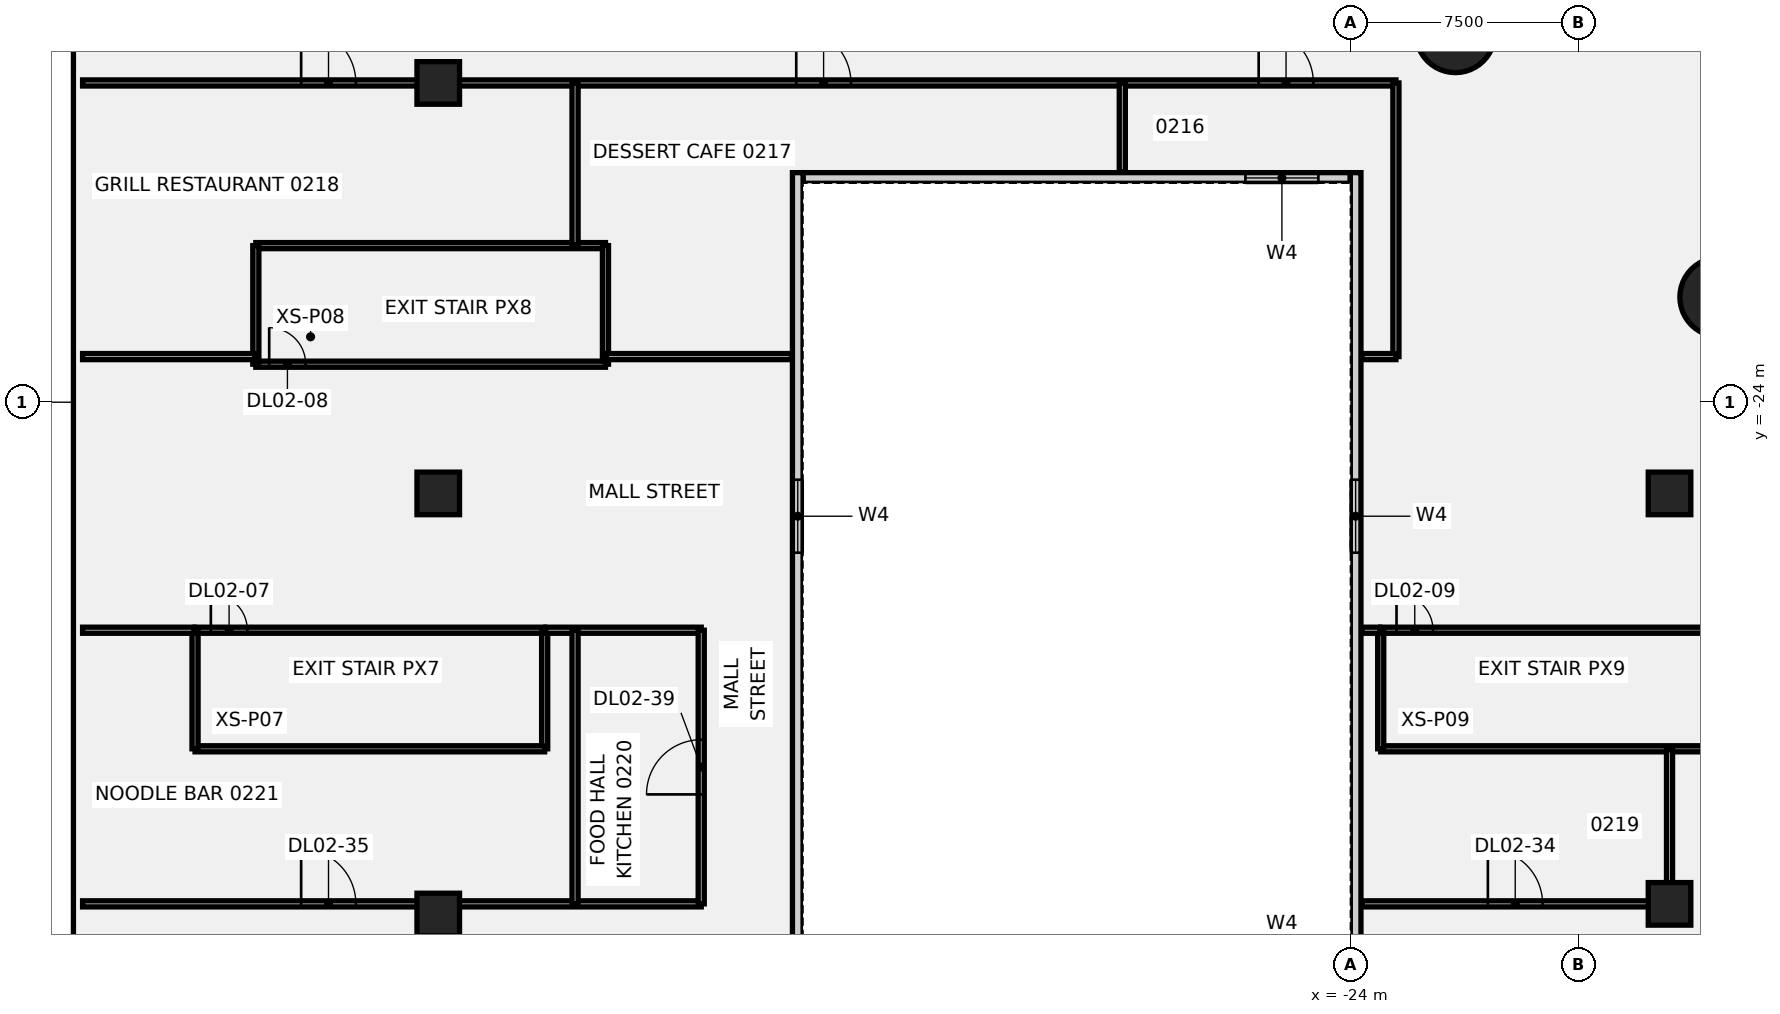
"""IFC4 building model, lengths in metres.
Left out: names, types, materials, properties, quantities, classifications, styles, units other than length and angle.
Written with IfcOpenShell. Run it as: python <this file> out.ifc"""

import sys

from ifc_helpers import new_model, si_unit, direction, frame, frame_2d, origin, origin_2d, place, context, subcontext, project, spatial, rectangle, circle, extrude, element, fill, save


model = new_model("IFC4")
c1 = context("Model", 3, precision=1e-05, world=origin(), true_north=direction((0.0, 1.0)))
c2 = subcontext(c1, "Body", "Model", "MODEL_VIEW")
j1 = project(units=[si_unit("LENGTHUNIT", "METRE"), si_unit("PLANEANGLEUNIT", "RADIAN")], contexts=[c1])
p1 = place(None, origin())
s1 = spatial("IfcSite", under=j1, at=p1, CompositionType="ELEMENT")
p2 = place(p1, origin())
s2 = spatial("IfcBuilding", under=s1, at=p2, CompositionType="ELEMENT")
p3 = place(p2, frame((0.0, 0.0, 15.0)))
s3 = spatial("IfcBuildingStorey", under=s2, at=p3, CompositionType="ELEMENT", Elevation=15.0)
for number, where, z_axis, x_axis in (
    (1, (-20.543, -11.86, -0.5), (0.0, 0.0, 1.0), (1.0, 0.0, 0.0)),
    (2, (-11.86, -20.543, -0.5), (0.0, 0.0, 1.0), (1.0, 0.0, 0.0)),
):
    element("IfcColumn", number, at=place(p3, frame(where, z_axis=z_axis, x_axis=x_axis)), inside=s3, PredefinedType="COLUMN", context=c2, shape_type="SweptSolid", body=[
        extrude(circle(Radius=1.3, at=origin_2d()), origin(), (0.0, 0.0, 1.0), 5.0),
    ])
for number, where, z_axis, x_axis in (
    (3, (-54.0, -40.85, -0.5), (0.0, 0.0, 1.0), (1.0, 0.0, 0.0)),
    (4, (-54.0, -27.0, -0.5), (0.0, 0.0, 1.0), (1.0, 0.0, 0.0)),
    (5, (-54.0, -13.5, -0.5), (0.0, 0.0, 1.0), (1.0, 0.0, 0.0)),
    (6, (-13.5, -40.5, -0.5), (0.0, 0.0, 1.0), (1.0, 0.0, 0.0)),
    (7, (-13.5, -27.0, -0.5), (0.0, 0.0, 1.0), (1.0, 0.0, 0.0)),
):
    element("IfcColumn", number, at=place(p3, frame(where, z_axis=z_axis, x_axis=x_axis)), inside=s3, PredefinedType="COLUMN", context=c2, shape_type="SweptSolid", body=[
        extrude(rectangle(XDim=1.4, YDim=1.4, at=origin_2d()), origin(), (0.0, 0.0, 1.0), 5.0),
    ])
p4 = place(p3, frame((-62.0, -31.5, 0.0), z_axis=(0.0, 0.0, 1.0), x_axis=(1.0, 0.0, 0.0)))
e8 = element("IfcWall", 8, at=p4, inside=s3, PredefinedType="PARTITIONING", context=c2, shape_type="SweptSolid", body=[
    extrude(rectangle(XDim=11.5, YDim=0.2, at=frame_2d((5.75, 0.0))), origin(), (0.0, 0.0, 1.0), 4.5),
])
p5 = place(p4, frame((0.52, 0.0, 0.0)))
e9 = element("IfcOpeningElement", 9, at=p5, cuts=e8, PredefinedType="OPENING", context=c2, shape_type="SweptSolid", body=[
    extrude(rectangle(XDim=1.2, YDim=2.1, at=frame_2d((0.6, 1.05))), frame((0.0, 0.11, 0.0), z_axis=(0.0, -1.0, 0.0), x_axis=(1.0, 0.0, 0.0)), (0.0, 0.0, 1.0), 0.22),
])
p6 = place(p3, frame((-50.5, -35.4, 0.0), z_axis=(0.0, 0.0, 1.0), x_axis=(0.0, 1.0, 0.0)))
e10 = element("IfcWall", 10, at=p6, inside=s3, PredefinedType="PARTITIONING", context=c2, shape_type="SweptSolid", body=[
    extrude(rectangle(XDim=3.9, YDim=0.2, at=frame_2d((1.95, 0.0))), origin(), (0.0, 0.0, 1.0), 4.5),
])
p7 = place(p3, frame((-62.0, -35.4, 0.0), z_axis=(0.0, 0.0, 1.0), x_axis=(1.0, 0.0, 0.0)))
e11 = element("IfcWall", 11, at=p7, inside=s3, PredefinedType="PARTITIONING", context=c2, shape_type="SweptSolid", body=[
    extrude(rectangle(XDim=11.5, YDim=0.2, at=frame_2d((5.75, 0.0))), origin(), (0.0, 0.0, 1.0), 4.5),
])
p8 = place(p3, frame((-62.0, -35.4, 0.0), z_axis=(0.0, 0.0, 1.0), x_axis=(0.0, 1.0, 0.0)))
e12 = element("IfcWall", 12, at=p8, inside=s3, PredefinedType="PARTITIONING", context=c2, shape_type="SweptSolid", body=[
    extrude(rectangle(XDim=3.9, YDim=0.2, at=frame_2d((1.95, 0.0))), origin(), (0.0, 0.0, 1.0), 4.5),
])
p9 = place(p3, frame((-60.0, -18.85, 0.0), z_axis=(0.0, 0.0, 1.0), x_axis=(1.0, 0.0, 0.0)))
e13 = element("IfcWall", 13, at=p9, inside=s3, PredefinedType="PARTITIONING", context=c2, shape_type="SweptSolid", body=[
    extrude(rectangle(XDim=11.5, YDim=0.2, at=frame_2d((5.75, 0.0))), origin(), (0.0, 0.0, 1.0), 4.5),
])
p10 = place(p3, frame((-48.5, -22.75, 0.0), z_axis=(0.0, 0.0, 1.0), x_axis=(0.0, 1.0, 0.0)))
e14 = element("IfcWall", 14, at=p10, inside=s3, PredefinedType="PARTITIONING", context=c2, shape_type="SweptSolid", body=[
    extrude(rectangle(XDim=3.9, YDim=0.2, at=frame_2d((1.95, 0.0))), origin(), (0.0, 0.0, 1.0), 4.5),
])
p11 = place(p3, frame((-60.0, -22.75, 0.0), z_axis=(0.0, 0.0, 1.0), x_axis=(1.0, 0.0, 0.0)))
e15 = element("IfcWall", 15, at=p11, inside=s3, PredefinedType="PARTITIONING", context=c2, shape_type="SweptSolid", body=[
    extrude(rectangle(XDim=11.5, YDim=0.2, at=frame_2d((5.75, 0.0))), origin(), (0.0, 0.0, 1.0), 4.5),
])
p12 = place(p11, frame((0.439, 0.0, 0.0)))
e16 = element("IfcOpeningElement", 16, at=p12, cuts=e15, PredefinedType="OPENING", context=c2, shape_type="SweptSolid", body=[
    extrude(rectangle(XDim=1.2, YDim=2.1, at=frame_2d((0.6, 1.05))), frame((0.0, 0.11, 0.0), z_axis=(0.0, -1.0, 0.0), x_axis=(1.0, 0.0, 0.0)), (0.0, 0.0, 1.0), 0.22),
])
p13 = place(p3, frame((-60.0, -22.75, 0.0), z_axis=(0.0, 0.0, 1.0), x_axis=(0.0, 1.0, 0.0)))
e17 = element("IfcWall", 17, at=p13, inside=s3, PredefinedType="PARTITIONING", context=c2, shape_type="SweptSolid", body=[
    extrude(rectangle(XDim=3.9, YDim=0.2, at=frame_2d((1.95, 0.0))), origin(), (0.0, 0.0, 1.0), 4.5),
])
p14 = place(p3, frame((-23.0, -31.5, 0.0), z_axis=(0.0, 0.0, 1.0), x_axis=(1.0, 0.0, 0.0)))
e18 = element("IfcWall", 18, at=p14, inside=s3, PredefinedType="PARTITIONING", context=c2, shape_type="SweptSolid", body=[
    extrude(rectangle(XDim=11.5, YDim=0.2, at=frame_2d((5.75, 0.0))), origin(), (0.0, 0.0, 1.0), 4.5),
])
p15 = place(p14, frame((0.52, 0.0, 0.0)))
e19 = element("IfcOpeningElement", 19, at=p15, cuts=e18, PredefinedType="OPENING", context=c2, shape_type="SweptSolid", body=[
    extrude(rectangle(XDim=1.2, YDim=2.1, at=frame_2d((0.6, 1.05))), frame((0.0, 0.11, 0.0), z_axis=(0.0, -1.0, 0.0), x_axis=(1.0, 0.0, 0.0)), (0.0, 0.0, 1.0), 0.22),
])
p16 = place(p3, frame((-23.0, -35.4, 0.0), z_axis=(0.0, 0.0, 1.0), x_axis=(1.0, 0.0, 0.0)))
e20 = element("IfcWall", 20, at=p16, inside=s3, PredefinedType="PARTITIONING", context=c2, shape_type="SweptSolid", body=[
    extrude(rectangle(XDim=11.5, YDim=0.2, at=frame_2d((5.75, 0.0))), origin(), (0.0, 0.0, 1.0), 4.5),
])
p17 = place(p3, frame((-23.0, -35.4, 0.0), z_axis=(0.0, 0.0, 1.0), x_axis=(0.0, 1.0, 0.0)))
e21 = element("IfcWall", 21, at=p17, inside=s3, PredefinedType="PARTITIONING", context=c2, shape_type="SweptSolid", body=[
    extrude(rectangle(XDim=3.9, YDim=0.2, at=frame_2d((1.95, 0.0))), origin(), (0.0, 0.0, 1.0), 4.5),
])
p18 = place(p3, frame((-65.699, -40.5, 0.0), z_axis=(0.0, 0.0, 1.0), x_axis=(1.0, 0.0, 0.0)))
e22 = element("IfcWall", 22, at=p18, inside=s3, PredefinedType="PARTITIONING", context=c2, shape_type="SweptSolid", body=[
    extrude(rectangle(XDim=20.349, YDim=0.2, at=frame_2d((10.174, 0.0))), origin(), (0.0, 0.0, 1.0), 4.5),
])
p19 = place(p18, frame((7.189, 0.0, 0.0)))
e23 = element("IfcOpeningElement", 23, at=p19, cuts=e22, PredefinedType="OPENING", context=c2, shape_type="SweptSolid", body=[
    extrude(rectangle(XDim=1.8, YDim=2.1, at=frame_2d((0.9, 1.05))), frame((0.0, 0.11, 0.0), z_axis=(0.0, -1.0, 0.0), x_axis=(1.0, 0.0, 0.0)), (0.0, 0.0, 1.0), 0.22),
])
p20 = place(p3, frame((-65.699, -31.5, 0.0), z_axis=(0.0, 0.0, 1.0), x_axis=(1.0, 0.0, 0.0)))
e24 = element("IfcWall", 24, at=p20, inside=s3, PredefinedType="PARTITIONING", context=c2, shape_type="SweptSolid", body=[
    extrude(rectangle(XDim=3.669, YDim=0.2, at=frame_2d((1.834, 0.0))), origin(), (0.0, 0.0, 1.0), 4.5),
])
p21 = place(p3, frame((-65.699, -22.5, 0.0), z_axis=(0.0, 0.0, 1.0), x_axis=(1.0, 0.0, 0.0)))
e25 = element("IfcWall", 25, at=p21, inside=s3, PredefinedType="PARTITIONING", context=c2, shape_type="SweptSolid", body=[
    extrude(rectangle(XDim=5.669, YDim=0.2, at=frame_2d((2.834, 0.0))), origin(), (0.0, 0.0, 1.0), 4.5),
])
p22 = place(p3, frame((-65.699, -13.5, 0.0), z_axis=(0.0, 0.0, 1.0), x_axis=(1.0, 0.0, 0.0)))
e26 = element("IfcWall", 26, at=p22, inside=s3, PredefinedType="PARTITIONING", context=c2, shape_type="SweptSolid", body=[
    extrude(rectangle(XDim=43.199, YDim=0.2, at=frame_2d((21.6, 0.0))), origin(), (0.0, 0.0, 1.0), 4.5),
])
p23 = place(p22, frame((38.685, 0.0, 0.0)))
e27 = element("IfcOpeningElement", 27, at=p23, cuts=e26, PredefinedType="OPENING", context=c2, shape_type="SweptSolid", body=[
    extrude(rectangle(XDim=1.8, YDim=2.1, at=frame_2d((0.9, 1.05))), frame((0.0, 0.11, 0.0), z_axis=(0.0, -1.0, 0.0), x_axis=(1.0, 0.0, 0.0)), (0.0, 0.0, 1.0), 0.22),
])
p24 = place(p22, frame((23.474, 0.0, 0.0)))
e28 = element("IfcOpeningElement", 28, at=p24, cuts=e26, PredefinedType="OPENING", context=c2, shape_type="SweptSolid", body=[
    extrude(rectangle(XDim=1.8, YDim=2.1, at=frame_2d((0.9, 1.05))), frame((0.0, 0.11, 0.0), z_axis=(0.0, -1.0, 0.0), x_axis=(1.0, 0.0, 0.0)), (0.0, 0.0, 1.0), 0.22),
])
p25 = place(p22, frame((7.189, 0.0, 0.0)))
e29 = element("IfcOpeningElement", 29, at=p25, cuts=e26, PredefinedType="OPENING", context=c2, shape_type="SweptSolid", body=[
    extrude(rectangle(XDim=1.8, YDim=2.1, at=frame_2d((0.9, 1.05))), frame((0.0, 0.11, 0.0), z_axis=(0.0, -1.0, 0.0), x_axis=(1.0, 0.0, 0.0)), (0.0, 0.0, 1.0), 0.22),
])
p26 = place(p3, frame((-50.47, -31.5, 0.0), z_axis=(0.0, 0.0, 1.0), x_axis=(1.0, 0.0, 0.0)))
e30 = element("IfcWall", 30, at=p26, inside=s3, PredefinedType="PARTITIONING", context=c2, shape_type="SweptSolid", body=[
    extrude(rectangle(XDim=5.12, YDim=0.2, at=frame_2d((2.56, 0.0))), origin(), (0.0, 0.0, 1.0), 4.5),
])
p27 = place(p3, frame((-45.35, -40.5, 0.0), z_axis=(0.0, 0.0, 1.0), x_axis=(0.0, 1.0, 0.0)))
e31 = element("IfcWall", 31, at=p27, inside=s3, PredefinedType="PARTITIONING", context=c2, shape_type="SweptSolid", body=[
    extrude(rectangle(XDim=9.0, YDim=0.2, at=frame_2d((4.5, 0.0))), origin(), (0.0, 0.0, 1.0), 4.5),
])
p28 = place(p27, frame((3.6, 0.0, 0.0)))
e32 = element("IfcOpeningElement", 32, at=p28, cuts=e31, PredefinedType="OPENING", context=c2, shape_type="SweptSolid", body=[
    extrude(rectangle(XDim=1.8, YDim=2.1, at=frame_2d((0.9, 1.05))), frame((0.0, 0.11, 0.0), z_axis=(0.0, -1.0, 0.0), x_axis=(1.0, 0.0, 0.0)), (0.0, 0.0, 1.0), 0.22),
])
p29 = place(p3, frame((-49.5, -40.5, 0.0), z_axis=(0.0, 0.0, 1.0), x_axis=(0.0, 1.0, 0.0)))
e33 = element("IfcWall", 33, at=p29, inside=s3, PredefinedType="PARTITIONING", context=c2, shape_type="SweptSolid", body=[
    extrude(rectangle(XDim=9.0, YDim=0.2, at=frame_2d((4.5, 0.0))), origin(), (0.0, 0.0, 1.0), 4.5),
])
p30 = place(p3, frame((-49.5, -18.82, 0.0), z_axis=(0.0, 0.0, 1.0), x_axis=(0.0, 1.0, 0.0)))
e34 = element("IfcWall", 34, at=p30, inside=s3, PredefinedType="PARTITIONING", context=c2, shape_type="SweptSolid", body=[
    extrude(rectangle(XDim=5.32, YDim=0.2, at=frame_2d((2.66, 0.0))), origin(), (0.0, 0.0, 1.0), 4.5),
])
p31 = place(p3, frame((-48.47, -22.5, 0.0), z_axis=(0.0, 0.0, 1.0), x_axis=(1.0, 0.0, 0.0)))
e35 = element("IfcWall", 35, at=p31, inside=s3, PredefinedType="PARTITIONING", context=c2, shape_type="SweptSolid", body=[
    extrude(rectangle(XDim=6.09, YDim=0.2, at=frame_2d((3.045, 0.0))), origin(), (0.0, 0.0, 1.0), 4.5),
])
p32 = place(p3, frame((-31.5, -16.42, 0.0), z_axis=(0.0, 0.0, 1.0), x_axis=(0.0, 1.0, 0.0)))
e36 = element("IfcWall", 36, at=p32, inside=s3, PredefinedType="PARTITIONING", context=c2, shape_type="SweptSolid", body=[
    extrude(rectangle(XDim=2.92, YDim=0.2, at=frame_2d((1.46, 0.0))), origin(), (0.0, 0.0, 1.0), 4.5),
])
p33 = place(p3, frame((-22.5, -22.5, 0.0), z_axis=(0.0, 0.0, 1.0), x_axis=(0.0, 1.0, 0.0)))
e37 = element("IfcWall", 37, at=p33, inside=s3, PredefinedType="PARTITIONING", context=c2, shape_type="SweptSolid", body=[
    extrude(rectangle(XDim=9.0, YDim=0.2, at=frame_2d((4.5, 0.0))), origin(), (0.0, 0.0, 1.0), 4.5),
])
p34 = place(p3, frame((-23.62, -22.5, 0.0), z_axis=(0.0, 0.0, 1.0), x_axis=(1.0, 0.0, 0.0)))
e38 = element("IfcWall", 38, at=p34, inside=s3, PredefinedType="PARTITIONING", context=c2, shape_type="SweptSolid", body=[
    extrude(rectangle(XDim=1.12, YDim=0.2, at=frame_2d((0.56, 0.0))), origin(), (0.0, 0.0, 1.0), 4.5),
])
p35 = place(p3, frame((-13.5, -40.5, 0.0), z_axis=(0.0, 0.0, 1.0), x_axis=(0.0, 1.0, 0.0)))
e39 = element("IfcWall", 39, at=p35, inside=s3, PredefinedType="PARTITIONING", context=c2, shape_type="SweptSolid", body=[
    extrude(rectangle(XDim=5.07, YDim=0.2, at=frame_2d((2.535, 0.0))), origin(), (0.0, 0.0, 1.0), 4.5),
])
p36 = place(p3, frame((-23.62, -40.5, 0.0), z_axis=(0.0, 0.0, 1.0), x_axis=(1.0, 0.0, 0.0)))
e40 = element("IfcWall", 40, at=p36, inside=s3, PredefinedType="PARTITIONING", context=c2, shape_type="SweptSolid", body=[
    extrude(rectangle(XDim=10.12, YDim=0.2, at=frame_2d((5.06, 0.0))), origin(), (0.0, 0.0, 1.0), 4.5),
])
p37 = place(p36, frame((4.145, 0.0, 0.0)))
e41 = element("IfcOpeningElement", 41, at=p37, cuts=e40, PredefinedType="OPENING", context=c2, shape_type="SweptSolid", body=[
    extrude(rectangle(XDim=1.8, YDim=2.1, at=frame_2d((0.9, 1.05))), frame((0.0, 0.11, 0.0), z_axis=(0.0, -1.0, 0.0), x_axis=(1.0, 0.0, 0.0)), (0.0, 0.0, 1.0), 0.22),
])
p38 = place(p3, frame((-23.62, -31.5, 0.0), z_axis=(0.0, 0.0, 1.0), x_axis=(1.0, 0.0, 0.0)))
e42 = element("IfcWall", 42, at=p38, inside=s3, PredefinedType="PARTITIONING", context=c2, shape_type="SweptSolid", body=[
    extrude(rectangle(XDim=0.59, YDim=0.2, at=frame_2d((0.295, 0.0))), origin(), (0.0, 0.0, 1.0), 4.5),
])
p39 = place(p3, frame((-42.0, -16.625, 0.0), z_axis=(0.0, 0.0, 1.0), x_axis=(1.0, 0.0, 0.0)))
e43 = element("IfcWall", 43, at=p39, inside=s3, PredefinedType="SOLIDWALL", context=c2, shape_type="SweptSolid", body=[
    extrude(rectangle(XDim=18.0, YDim=0.35, at=frame_2d((9.0, 0.0))), origin(), (0.0, 0.0, 1.0), 4.5),
])
p40 = place(p39, frame((14.55, 0.0, 1.0)))
e44 = element("IfcOpeningElement", 44, at=p40, cuts=e43, PredefinedType="OPENING", context=c2, shape_type="SweptSolid", body=[
    extrude(rectangle(XDim=2.4, YDim=1.8, at=frame_2d((1.2, 0.9))), frame((0.0, 0.185, 0.0), z_axis=(0.0, -1.0, 0.0), x_axis=(1.0, 0.0, 0.0)), (0.0, 0.0, 1.0), 0.37),
])
p41 = place(p3, frame((-42.175, -43.85, 0.0), z_axis=(0.0, 0.0, 1.0), x_axis=(0.0, 1.0, 0.0)))
e45 = element("IfcWall", 45, at=p41, inside=s3, PredefinedType="SOLIDWALL", context=c2, shape_type="SweptSolid", body=[
    extrude(rectangle(XDim=27.4, YDim=0.35, at=frame_2d((13.7, 0.0))), origin(), (0.0, 0.0, 1.0), 4.5),
])
p42 = place(p41, frame((14.9, 0.0, 1.0)))
e46 = element("IfcOpeningElement", 46, at=p42, cuts=e45, PredefinedType="OPENING", context=c2, shape_type="SweptSolid", body=[
    extrude(rectangle(XDim=2.4, YDim=1.8, at=frame_2d((1.2, 0.9))), frame((0.0, 0.185, 0.0), z_axis=(0.0, -1.0, 0.0), x_axis=(1.0, 0.0, 0.0)), (0.0, 0.0, 1.0), 0.37),
])
p43 = place(p3, frame((-23.825, -43.85, 0.0), z_axis=(0.0, 0.0, 1.0), x_axis=(0.0, 1.0, 0.0)))
e47 = element("IfcWall", 47, at=p43, inside=s3, PredefinedType="SOLIDWALL", context=c2, shape_type="SweptSolid", body=[
    extrude(rectangle(XDim=27.4, YDim=0.35, at=frame_2d((13.7, 0.0))), origin(), (0.0, 0.0, 1.0), 4.5),
])
p44 = place(p43, frame((14.9, 0.0, 1.0)))
e48 = element("IfcOpeningElement", 48, at=p44, cuts=e47, PredefinedType="OPENING", context=c2, shape_type="SweptSolid", body=[
    extrude(rectangle(XDim=2.4, YDim=1.8, at=frame_2d((1.2, 0.9))), frame((0.0, 0.185, 0.0), z_axis=(0.0, -1.0, 0.0), x_axis=(1.0, 0.0, 0.0)), (0.0, 0.0, 1.0), 0.37),
])
p45 = place(p5, origin())
e49 = element("IfcDoor", 49, at=p45, inside=s3, OperationType="SINGLE_SWING_LEFT", PredefinedType="DOOR", context=c2, shape_type="SweptSolid", body=[
    extrude(rectangle(XDim=1.2, YDim=2.1, at=frame_2d((0.6, 1.05))), frame((0.0, 0.025, 0.0), z_axis=(0.0, -1.0, 0.0), x_axis=(1.0, 0.0, 0.0)), (0.0, 0.0, 1.0), 0.05),
])
fill(e9, e49)
p46 = place(p12, origin())
e50 = element("IfcDoor", 50, at=p46, inside=s3, OperationType="SINGLE_SWING_RIGHT", PredefinedType="DOOR", context=c2, shape_type="SweptSolid", body=[
    extrude(rectangle(XDim=1.2, YDim=2.1, at=frame_2d((0.6, 1.05))), frame((0.0, 0.025, 0.0), z_axis=(0.0, -1.0, 0.0), x_axis=(1.0, 0.0, 0.0)), (0.0, 0.0, 1.0), 0.05),
])
fill(e16, e50)
p47 = place(p15, origin())
e51 = element("IfcDoor", 51, at=p47, inside=s3, OperationType="SINGLE_SWING_LEFT", PredefinedType="DOOR", context=c2, shape_type="SweptSolid", body=[
    extrude(rectangle(XDim=1.2, YDim=2.1, at=frame_2d((0.6, 1.05))), frame((0.0, 0.025, 0.0), z_axis=(0.0, -1.0, 0.0), x_axis=(1.0, 0.0, 0.0)), (0.0, 0.0, 1.0), 0.05),
])
fill(e19, e51)
p48 = place(p23, origin())
e52 = element("IfcDoor", 52, at=p48, inside=s3, OperationType="SINGLE_SWING_LEFT", PredefinedType="DOOR", context=c2, shape_type="SweptSolid", body=[
    extrude(rectangle(XDim=1.8, YDim=2.1, at=frame_2d((0.9, 1.05))), frame((0.0, 0.025, 0.0), z_axis=(0.0, -1.0, 0.0), x_axis=(1.0, 0.0, 0.0)), (0.0, 0.0, 1.0), 0.05),
])
fill(e27, e52)
p49 = place(p24, origin())
e53 = element("IfcDoor", 53, at=p49, inside=s3, OperationType="SINGLE_SWING_RIGHT", PredefinedType="DOOR", context=c2, shape_type="SweptSolid", body=[
    extrude(rectangle(XDim=1.8, YDim=2.1, at=frame_2d((0.9, 1.05))), frame((0.0, 0.025, 0.0), z_axis=(0.0, -1.0, 0.0), x_axis=(1.0, 0.0, 0.0)), (0.0, 0.0, 1.0), 0.05),
])
fill(e28, e53)
p50 = place(p25, origin())
e54 = element("IfcDoor", 54, at=p50, inside=s3, OperationType="SINGLE_SWING_LEFT", PredefinedType="DOOR", context=c2, shape_type="SweptSolid", body=[
    extrude(rectangle(XDim=1.8, YDim=2.1, at=frame_2d((0.9, 1.05))), frame((0.0, 0.025, 0.0), z_axis=(0.0, -1.0, 0.0), x_axis=(1.0, 0.0, 0.0)), (0.0, 0.0, 1.0), 0.05),
])
fill(e29, e54)
p51 = place(p37, origin())
e55 = element("IfcDoor", 55, at=p51, inside=s3, OperationType="SINGLE_SWING_RIGHT", PredefinedType="DOOR", context=c2, shape_type="SweptSolid", body=[
    extrude(rectangle(XDim=1.8, YDim=2.1, at=frame_2d((0.9, 1.05))), frame((0.0, 0.025, 0.0), z_axis=(0.0, -1.0, 0.0), x_axis=(1.0, 0.0, 0.0)), (0.0, 0.0, 1.0), 0.05),
])
fill(e41, e55)
p52 = place(p19, origin())
e56 = element("IfcDoor", 56, at=p52, inside=s3, OperationType="SINGLE_SWING_LEFT", PredefinedType="DOOR", context=c2, shape_type="SweptSolid", body=[
    extrude(rectangle(XDim=1.8, YDim=2.1, at=frame_2d((0.9, 1.05))), frame((0.0, 0.025, 0.0), z_axis=(0.0, -1.0, 0.0), x_axis=(1.0, 0.0, 0.0)), (0.0, 0.0, 1.0), 0.05),
])
fill(e23, e56)
p53 = place(p28, origin())
e57 = element("IfcDoor", 57, at=p53, inside=s3, OperationType="SINGLE_SWING_LEFT", PredefinedType="DOOR", context=c2, shape_type="SweptSolid", body=[
    extrude(rectangle(XDim=1.8, YDim=2.1, at=frame_2d((0.9, 1.05))), frame((0.0, 0.025, 0.0), z_axis=(0.0, -1.0, 0.0), x_axis=(1.0, 0.0, 0.0)), (0.0, 0.0, 1.0), 0.05),
])
fill(e32, e57)
p54 = place(p40, origin())
e58 = element("IfcWindow", 58, at=p54, inside=s3, PartitioningType="SINGLE_PANEL", PredefinedType="WINDOW", context=c2, shape_type="SweptSolid", body=[
    extrude(rectangle(XDim=2.4, YDim=1.8, at=frame_2d((1.2, 0.9))), frame((0.0, 0.03, 0.0), z_axis=(0.0, -1.0, 0.0), x_axis=(1.0, 0.0, 0.0)), (0.0, 0.0, 1.0), 0.06),
])
fill(e44, e58)
p55 = place(p42, origin())
e59 = element("IfcWindow", 59, at=p55, inside=s3, PartitioningType="SINGLE_PANEL", PredefinedType="WINDOW", context=c2, shape_type="SweptSolid", body=[
    extrude(rectangle(XDim=2.4, YDim=1.8, at=frame_2d((1.2, 0.9))), frame((0.0, 0.03, 0.0), z_axis=(0.0, -1.0, 0.0), x_axis=(1.0, 0.0, 0.0)), (0.0, 0.0, 1.0), 0.06),
])
fill(e46, e59)
p56 = place(p44, origin())
e60 = element("IfcWindow", 60, at=p56, inside=s3, PartitioningType="SINGLE_PANEL", PredefinedType="WINDOW", context=c2, shape_type="SweptSolid", body=[
    extrude(rectangle(XDim=2.4, YDim=1.8, at=frame_2d((1.2, 0.9))), frame((0.0, 0.03, 0.0), z_axis=(0.0, -1.0, 0.0), x_axis=(1.0, 0.0, 0.0)), (0.0, 0.0, 1.0), 0.06),
])
fill(e48, e60)
save(model, sys.argv[1])
